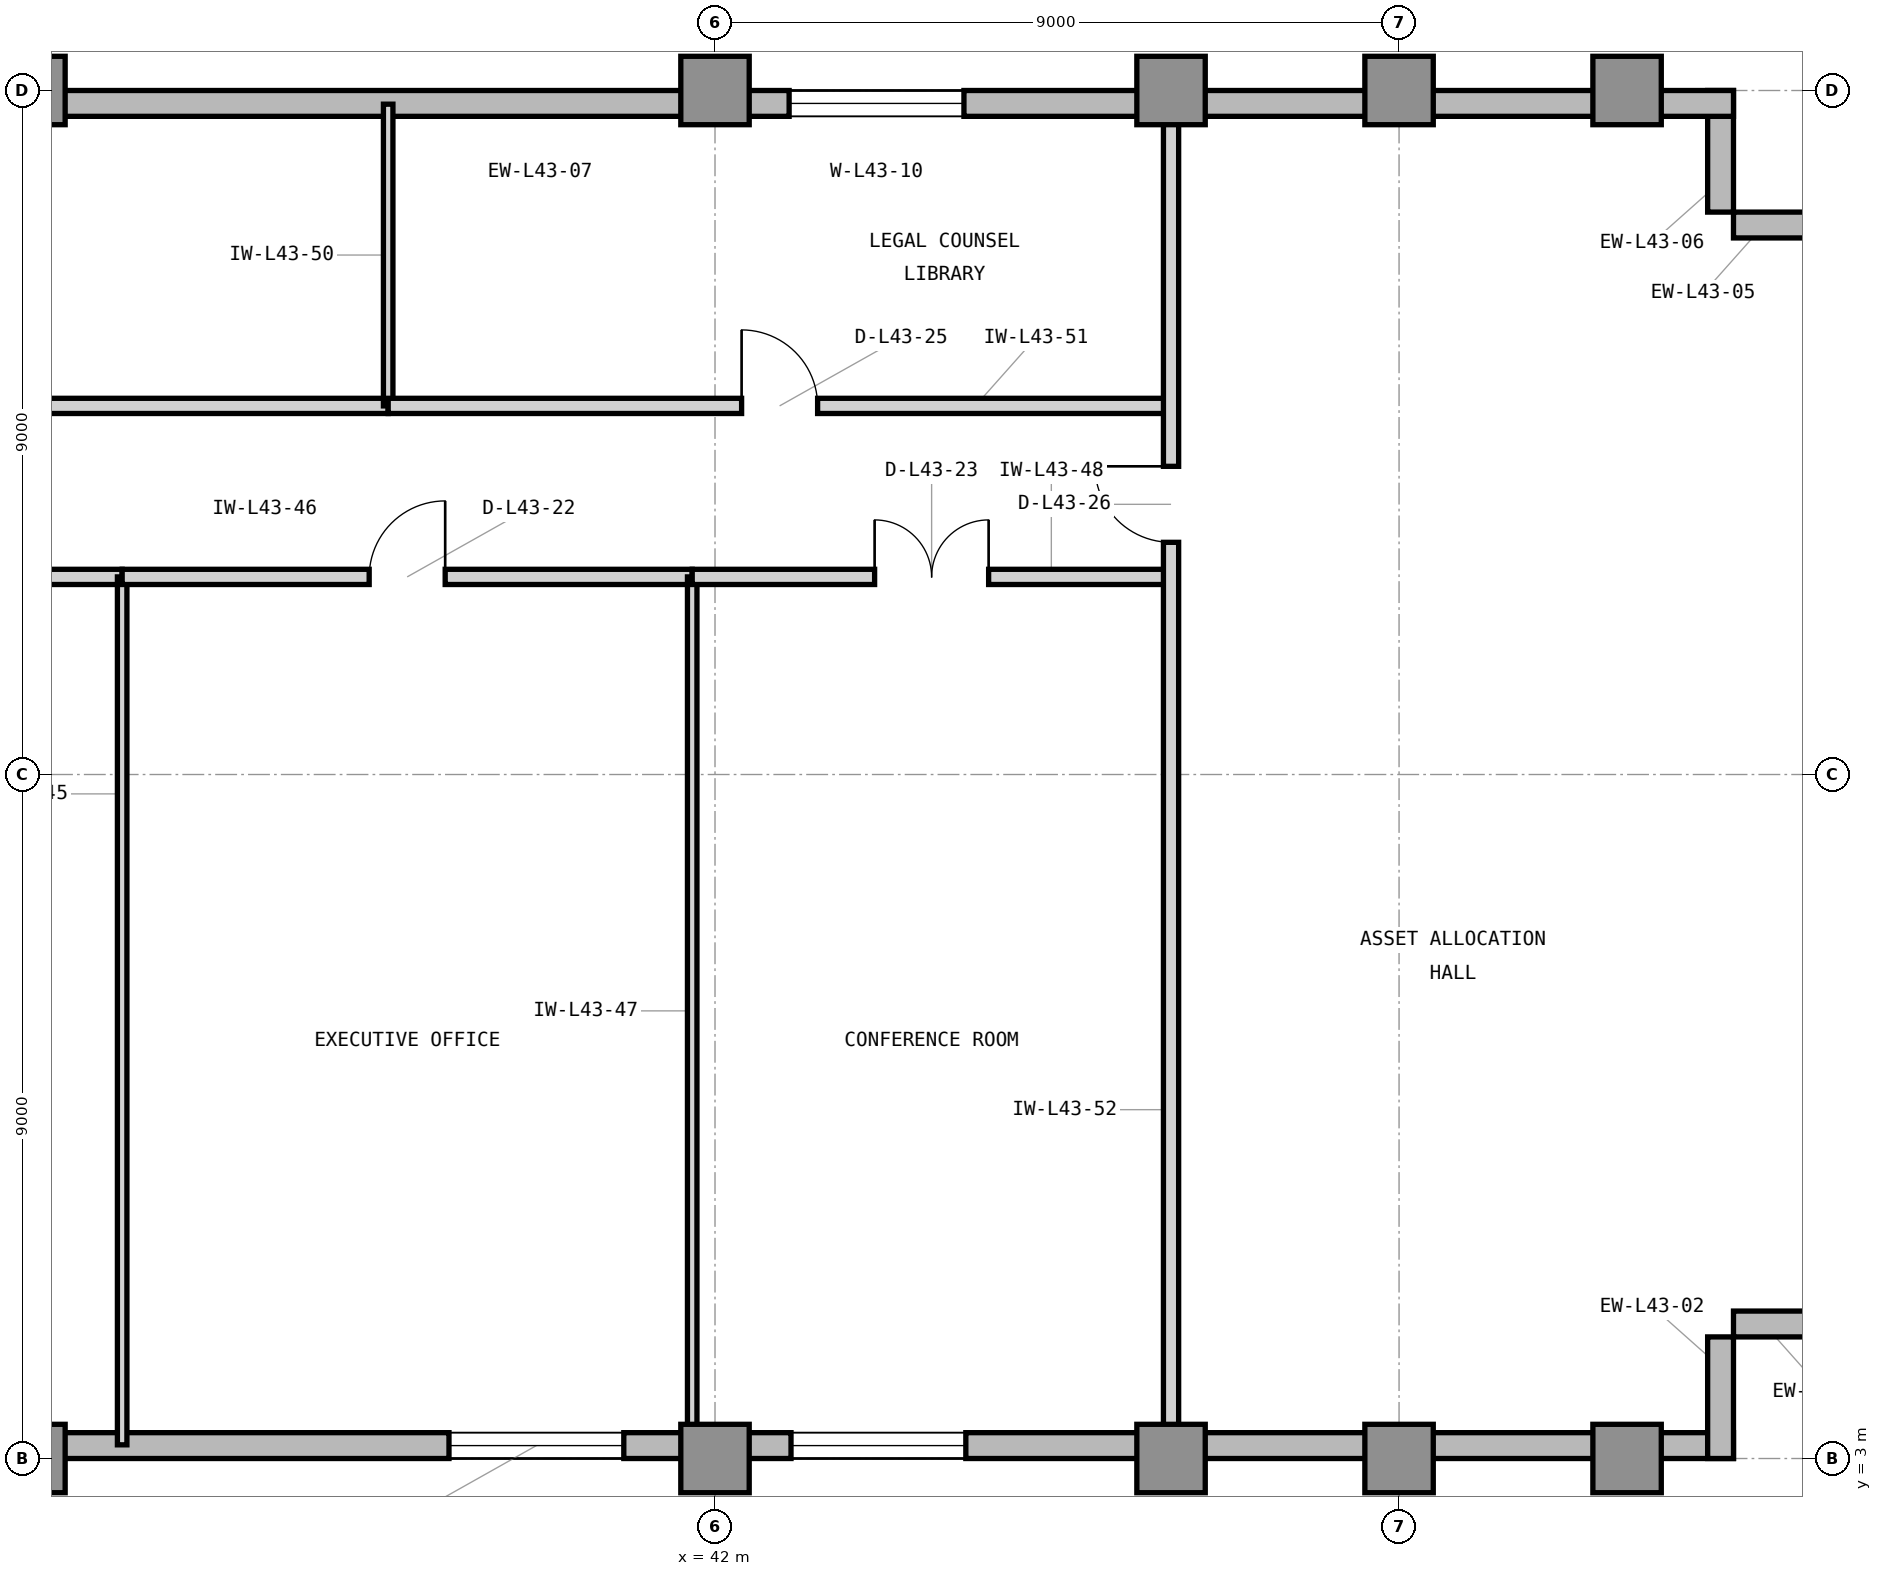
"""IFC4 building model, lengths in metres.
Left out: names, types, materials, properties, quantities, classifications, styles, units other than length and angle.
Written with IfcOpenShell. Run it as: python <this file> out.ifc"""

import sys

from ifc_helpers import new_model, si_unit, direction, frame, frame_2d, origin, origin_2d, place, context, subcontext, project, spatial, rectangle, extrude, element, fill, save


model = new_model("IFC4")
c1 = context("Model", 3, precision=1e-05, world=origin(), true_north=direction((0.0, 1.0)))
c2 = subcontext(c1, "Body", "Model", "MODEL_VIEW")
j1 = project(units=[si_unit("LENGTHUNIT", "METRE"), si_unit("PLANEANGLEUNIT", "RADIAN")], contexts=[c1])
p1 = place(None, origin())
s1 = spatial("IfcSite", under=j1, at=p1, CompositionType="ELEMENT")
p2 = place(p1, origin())
s2 = spatial("IfcBuilding", under=s1, at=p2, CompositionType="ELEMENT")
p3 = place(p2, frame((0.0, 0.0, 180.0)))
s3 = spatial("IfcBuildingStorey", under=s2, at=p3, CompositionType="ELEMENT", Elevation=180.0)
for number, where, z_axis, x_axis in (
    (1, (33.0, 3.0, 0.0), (0.0, 0.0, 1.0), (1.0, 0.0, 0.0)),
    (2, (33.0, 21.0, 0.0), (0.0, 0.0, 1.0), (1.0, 0.0, 0.0)),
    (3, (42.0, 3.0, 0.0), (0.0, 0.0, 1.0), (1.0, 0.0, 0.0)),
    (4, (42.0, 21.0, 0.0), (0.0, 0.0, 1.0), (1.0, 0.0, 0.0)),
    (5, (48.0, 3.0, 0.0), (0.0, 0.0, 1.0), (1.0, 0.0, 0.0)),
    (6, (48.0, 21.0, 0.0), (0.0, 0.0, 1.0), (1.0, 0.0, 0.0)),
    (7, (51.0, 3.0, 0.0), (0.0, 0.0, 1.0), (1.0, 0.0, 0.0)),
    (8, (51.0, 21.0, 0.0), (0.0, 0.0, 1.0), (1.0, 0.0, 0.0)),
    (9, (54.0, 3.0, 0.0), (0.0, 0.0, 1.0), (1.0, 0.0, 0.0)),
    (10, (54.0, 21.0, 0.0), (0.0, 0.0, 1.0), (1.0, 0.0, 0.0)),
):
    element("IfcColumn", number, at=place(p3, frame(where, z_axis=z_axis, x_axis=x_axis)), inside=s3, PredefinedType="COLUMN", context=c2, shape_type="SweptSolid", body=[
        extrude(rectangle(XDim=0.9, YDim=0.9, at=origin_2d()), origin(), (0.0, 0.0, 1.0), 3.9),
    ])
p4 = place(p3, frame((23.9, 3.17, 0.0), z_axis=(0.0, 0.0, 1.0), x_axis=(1.0, 0.0, 0.0)))
e11 = element("IfcWall", 11, at=p4, inside=s3, PredefinedType="STANDARD", context=c2, shape_type="SweptSolid", body=[
    extrude(rectangle(XDim=31.5, YDim=0.34, at=frame_2d((15.75, 0.0))), origin(), (0.0, 0.0, 1.0), 3.7),
])
p5 = place(p4, frame((5.6, 0.0, 0.9)))
e12 = element("IfcOpeningElement", 12, at=p5, cuts=e11, PredefinedType="OPENING", context=c2, shape_type="SweptSolid", body=[
    extrude(rectangle(XDim=2.3, YDim=2.2, at=frame_2d((1.15, 1.1))), frame((0.0, 0.18, 0.0), z_axis=(0.0, -1.0, 0.0), x_axis=(1.0, 0.0, 0.0)), (0.0, 0.0, 1.0), 0.36),
])
p6 = place(p4, frame((14.6, 0.0, 0.9)))
e13 = element("IfcOpeningElement", 13, at=p6, cuts=e11, PredefinedType="OPENING", context=c2, shape_type="SweptSolid", body=[
    extrude(rectangle(XDim=2.3, YDim=2.2, at=frame_2d((1.15, 1.1))), frame((0.0, 0.18, 0.0), z_axis=(0.0, -1.0, 0.0), x_axis=(1.0, 0.0, 0.0)), (0.0, 0.0, 1.0), 0.36),
])
p7 = place(p4, frame((19.1, 0.0, 0.9)))
e14 = element("IfcOpeningElement", 14, at=p7, cuts=e11, PredefinedType="OPENING", context=c2, shape_type="SweptSolid", body=[
    extrude(rectangle(XDim=2.3, YDim=2.2, at=frame_2d((1.15, 1.1))), frame((0.0, 0.18, 0.0), z_axis=(0.0, -1.0, 0.0), x_axis=(1.0, 0.0, 0.0)), (0.0, 0.0, 1.0), 0.36),
])
p8 = place(p4, frame((0.9, 0.0, 0.9)))
e15 = element("IfcOpeningElement", 15, at=p8, cuts=e11, PredefinedType="OPENING", context=c2, shape_type="SweptSolid", body=[
    extrude(rectangle(XDim=1.6, YDim=2.2, at=frame_2d((0.8, 1.1))), frame((0.0, 0.18, 0.0), z_axis=(0.0, -1.0, 0.0), x_axis=(1.0, 0.0, 0.0)), (0.0, 0.0, 1.0), 0.36),
])
for number, where, z_axis, x_axis in (
    (16, (55.23, 3.0, 0.0), (0.0, 0.0, 1.0), (0.0, 1.0, 0.0)),
    (17, (55.4, 4.77, 0.0), (0.0, 0.0, 1.0), (1.0, 0.0, 0.0)),
    (18, (57.0, 19.23, 0.0), (0.0, 0.0, 1.0), (-1.0, 0.0, 0.0)),
    (19, (55.23, 19.4, 0.0), (0.0, 0.0, 1.0), (0.0, 1.0, 0.0)),
):
    element("IfcWall", number, at=place(p3, frame(where, z_axis=z_axis, x_axis=x_axis)), inside=s3, PredefinedType="STANDARD", context=c2, shape_type="SweptSolid", body=[
        extrude(rectangle(XDim=1.6, YDim=0.34, at=frame_2d((0.8, 0.0))), origin(), (0.0, 0.0, 1.0), 3.7),
    ])
p9 = place(p3, frame((55.4, 20.83, 0.0), z_axis=(0.0, 0.0, 1.0), x_axis=(-1.0, 0.0, 0.0)))
e20 = element("IfcWall", 20, at=p9, inside=s3, PredefinedType="STANDARD", context=c2, shape_type="SweptSolid", body=[
    extrude(rectangle(XDim=31.4, YDim=0.34, at=frame_2d((15.7, 0.0))), origin(), (0.0, 0.0, 1.0), 3.7),
])
p10 = place(p9, frame((29.046, 0.0, 0.9)))
e21 = element("IfcOpeningElement", 21, at=p10, cuts=e20, PredefinedType="OPENING", context=c2, shape_type="SweptSolid", body=[
    extrude(rectangle(XDim=1.6, YDim=2.2, at=frame_2d((0.8, 1.1))), frame((0.0, 0.18, 0.0), z_axis=(0.0, -1.0, 0.0), x_axis=(1.0, 0.0, 0.0)), (0.0, 0.0, 1.0), 0.36),
])
p11 = place(p9, frame((10.125, 0.0, 0.9)))
e22 = element("IfcOpeningElement", 22, at=p11, cuts=e20, PredefinedType="OPENING", context=c2, shape_type="SweptSolid", body=[
    extrude(rectangle(XDim=2.3, YDim=2.2, at=frame_2d((1.15, 1.1))), frame((0.0, 0.18, 0.0), z_axis=(0.0, -1.0, 0.0), x_axis=(1.0, 0.0, 0.0)), (0.0, 0.0, 1.0), 0.36),
])
p12 = place(p3, frame((26.7, 14.6, 0.0), z_axis=(0.0, 0.0, 1.0), x_axis=(1.0, 0.0, 0.0)))
e23 = element("IfcWall", 23, at=p12, inside=s3, PredefinedType="PARTITIONING", context=c2, shape_type="SweptSolid", body=[
    extrude(rectangle(XDim=7.5, YDim=0.2, at=frame_2d((3.75, 0.0))), origin(), (0.0, 0.0, 1.0), 3.69),
])
p13 = place(p12, frame((2.75, 0.0, 0.0)))
e24 = element("IfcOpeningElement", 24, at=p13, cuts=e23, PredefinedType="OPENING", context=c2, shape_type="SweptSolid", body=[
    extrude(rectangle(XDim=2.0, YDim=2.5, at=frame_2d((1.0, 1.25))), frame((0.0, 0.11, 0.0), z_axis=(0.0, -1.0, 0.0), x_axis=(1.0, 0.0, 0.0)), (0.0, 0.0, 1.0), 0.22),
])
p14 = place(p3, frame((34.2, 3.18, 0.0), z_axis=(0.0, 0.0, 1.0), x_axis=(0.0, 1.0, 0.0)))
e25 = element("IfcWall", 25, at=p14, inside=s3, PredefinedType="PARTITIONING", context=c2, shape_type="SweptSolid", body=[
    extrude(rectangle(XDim=11.42, YDim=0.125, at=frame_2d((5.71, 0.0))), origin(), (0.0, 0.0, 1.0), 3.69),
])
p15 = place(p3, frame((34.2, 14.6, 0.0), z_axis=(0.0, 0.0, 1.0), x_axis=(1.0, 0.0, 0.0)))
e26 = element("IfcWall", 26, at=p15, inside=s3, PredefinedType="PARTITIONING", context=c2, shape_type="SweptSolid", body=[
    extrude(rectangle(XDim=7.5, YDim=0.2, at=frame_2d((3.75, 0.0))), origin(), (0.0, 0.0, 1.0), 3.69),
])
p16 = place(p15, frame((3.25, 0.0, 0.0)))
e27 = element("IfcOpeningElement", 27, at=p16, cuts=e26, PredefinedType="OPENING", context=c2, shape_type="SweptSolid", body=[
    extrude(rectangle(XDim=1.0, YDim=2.15, at=frame_2d((0.5, 1.075))), frame((0.0, 0.11, 0.0), z_axis=(0.0, -1.0, 0.0), x_axis=(1.0, 0.0, 0.0)), (0.0, 0.0, 1.0), 0.22),
])
p17 = place(p3, frame((41.7, 3.18, 0.0), z_axis=(0.0, 0.0, 1.0), x_axis=(0.0, 1.0, 0.0)))
e28 = element("IfcWall", 28, at=p17, inside=s3, PredefinedType="PARTITIONING", context=c2, shape_type="SweptSolid", body=[
    extrude(rectangle(XDim=11.42, YDim=0.125, at=frame_2d((5.71, 0.0))), origin(), (0.0, 0.0, 1.0), 3.69),
])
p18 = place(p3, frame((41.7, 14.6, 0.0), z_axis=(0.0, 0.0, 1.0), x_axis=(1.0, 0.0, 0.0)))
e29 = element("IfcWall", 29, at=p18, inside=s3, PredefinedType="PARTITIONING", context=c2, shape_type="SweptSolid", body=[
    extrude(rectangle(XDim=6.3, YDim=0.2, at=frame_2d((3.15, 0.0))), origin(), (0.0, 0.0, 1.0), 3.69),
])
p19 = place(p18, frame((2.4, 0.0, 0.0)))
e30 = element("IfcOpeningElement", 30, at=p19, cuts=e29, PredefinedType="OPENING", context=c2, shape_type="SweptSolid", body=[
    extrude(rectangle(XDim=1.5, YDim=2.3, at=frame_2d((0.75, 1.15))), frame((0.0, 0.11, 0.0), z_axis=(0.0, -1.0, 0.0), x_axis=(1.0, 0.0, 0.0)), (0.0, 0.0, 1.0), 0.22),
])
p20 = place(p3, frame((26.7, 16.85, 0.0), z_axis=(0.0, 0.0, 1.0), x_axis=(1.0, 0.0, 0.0)))
e31 = element("IfcWall", 31, at=p20, inside=s3, PredefinedType="PARTITIONING", context=c2, shape_type="SweptSolid", body=[
    extrude(rectangle(XDim=11.0, YDim=0.2, at=frame_2d((5.5, 0.0))), origin(), (0.0, 0.0, 1.0), 3.69),
])
p21 = place(p20, frame((4.75, 0.0, 0.0)))
e32 = element("IfcOpeningElement", 32, at=p21, cuts=e31, PredefinedType="OPENING", context=c2, shape_type="SweptSolid", body=[
    extrude(rectangle(XDim=1.5, YDim=2.3, at=frame_2d((0.75, 1.15))), frame((0.0, 0.11, 0.0), z_axis=(0.0, -1.0, 0.0), x_axis=(1.0, 0.0, 0.0)), (0.0, 0.0, 1.0), 0.22),
])
p22 = place(p3, frame((37.7, 16.85, 0.0), z_axis=(0.0, 0.0, 1.0), x_axis=(0.0, 1.0, 0.0)))
e33 = element("IfcWall", 33, at=p22, inside=s3, PredefinedType="PARTITIONING", context=c2, shape_type="SweptSolid", body=[
    extrude(rectangle(XDim=3.97, YDim=0.125, at=frame_2d((1.985, 0.0))), origin(), (0.0, 0.0, 1.0), 3.69),
])
p23 = place(p3, frame((37.7, 16.85, 0.0), z_axis=(0.0, 0.0, 1.0), x_axis=(1.0, 0.0, 0.0)))
e34 = element("IfcWall", 34, at=p23, inside=s3, PredefinedType="PARTITIONING", context=c2, shape_type="SweptSolid", body=[
    extrude(rectangle(XDim=10.3, YDim=0.2, at=frame_2d((5.15, 0.0))), origin(), (0.0, 0.0, 1.0), 3.69),
])
p24 = place(p23, frame((4.65, 0.0, 0.0)))
e35 = element("IfcOpeningElement", 35, at=p24, cuts=e34, PredefinedType="OPENING", context=c2, shape_type="SweptSolid", body=[
    extrude(rectangle(XDim=1.0, YDim=2.15, at=frame_2d((0.5, 1.075))), frame((0.0, 0.11, 0.0), z_axis=(0.0, -1.0, 0.0), x_axis=(1.0, 0.0, 0.0)), (0.0, 0.0, 1.0), 0.22),
])
p25 = place(p3, frame((48.0, 3.18, 0.0), z_axis=(0.0, 0.0, 1.0), x_axis=(0.0, 1.0, 0.0)))
e36 = element("IfcWall", 36, at=p25, inside=s3, PredefinedType="PARTITIONING", context=c2, shape_type="SweptSolid", body=[
    extrude(rectangle(XDim=17.64, YDim=0.2, at=frame_2d((8.82, 0.0))), origin(), (0.0, 0.0, 1.0), 3.073),
])
p26 = place(p25, frame((11.875, 0.0, 0.0)))
e37 = element("IfcOpeningElement", 37, at=p26, cuts=e36, PredefinedType="OPENING", context=c2, shape_type="SweptSolid", body=[
    extrude(rectangle(XDim=1.0, YDim=2.15, at=frame_2d((0.5, 1.075))), frame((0.0, 0.11, 0.0), z_axis=(0.0, -1.0, 0.0), x_axis=(1.0, 0.0, 0.0)), (0.0, 0.0, 1.0), 0.22),
])
p27 = place(p6, origin())
e38 = element("IfcWindow", 38, at=p27, inside=s3, PartitioningType="SINGLE_PANEL", PredefinedType="WINDOW", context=c2, shape_type="SweptSolid", body=[
    extrude(rectangle(XDim=2.3, YDim=2.2, at=frame_2d((1.15, 1.1))), frame((0.0, 0.11, 0.0), z_axis=(0.0, -1.0, 0.0), x_axis=(1.0, 0.0, 0.0)), (0.0, 0.0, 1.0), 0.06),
])
fill(e13, e38)
p28 = place(p7, origin())
e39 = element("IfcWindow", 39, at=p28, inside=s3, PartitioningType="SINGLE_PANEL", PredefinedType="WINDOW", context=c2, shape_type="SweptSolid", body=[
    extrude(rectangle(XDim=2.3, YDim=2.2, at=frame_2d((1.15, 1.1))), frame((0.0, 0.11, 0.0), z_axis=(0.0, -1.0, 0.0), x_axis=(1.0, 0.0, 0.0)), (0.0, 0.0, 1.0), 0.06),
])
fill(e14, e39)
p29 = place(p16, origin())
e40 = element("IfcDoor", 40, at=p29, inside=s3, OperationType="SINGLE_SWING_RIGHT", PredefinedType="DOOR", context=c2, shape_type="SweptSolid", body=[
    extrude(rectangle(XDim=1.0, YDim=2.15, at=frame_2d((0.5, 1.075))), frame((0.0, 0.025, 0.0), z_axis=(0.0, -1.0, 0.0), x_axis=(1.0, 0.0, 0.0)), (0.0, 0.0, 1.0), 0.05),
])
fill(e27, e40)
p30 = place(p19, origin())
e41 = element("IfcDoor", 41, at=p30, inside=s3, OperationType="DOUBLE_DOOR_SINGLE_SWING", PredefinedType="DOOR", context=c2, shape_type="SweptSolid", body=[
    extrude(rectangle(XDim=1.5, YDim=2.3, at=frame_2d((0.75, 1.15))), frame((0.0, 0.025, 0.0), z_axis=(0.0, -1.0, 0.0), x_axis=(1.0, 0.0, 0.0)), (0.0, 0.0, 1.0), 0.05),
])
fill(e30, e41)
p31 = place(p24, origin())
e42 = element("IfcDoor", 42, at=p31, inside=s3, OperationType="SINGLE_SWING_LEFT", PredefinedType="DOOR", context=c2, shape_type="SweptSolid", body=[
    extrude(rectangle(XDim=1.0, YDim=2.15, at=frame_2d((0.5, 1.075))), frame((0.0, 0.025, 0.0), z_axis=(0.0, -1.0, 0.0), x_axis=(1.0, 0.0, 0.0)), (0.0, 0.0, 1.0), 0.05),
])
fill(e35, e42)
p32 = place(p26, origin())
e43 = element("IfcDoor", 43, at=p32, inside=s3, OperationType="SINGLE_SWING_RIGHT", PredefinedType="DOOR", context=c2, shape_type="SweptSolid", body=[
    extrude(rectangle(XDim=1.0, YDim=2.15, at=frame_2d((0.5, 1.075))), frame((0.0, 0.025, 0.0), z_axis=(0.0, -1.0, 0.0), x_axis=(1.0, 0.0, 0.0)), (0.0, 0.0, 1.0), 0.05),
])
fill(e37, e43)
p33 = place(p11, origin())
e44 = element("IfcWindow", 44, at=p33, inside=s3, PartitioningType="SINGLE_PANEL", PredefinedType="WINDOW", context=c2, shape_type="SweptSolid", body=[
    extrude(rectangle(XDim=2.3, YDim=2.2, at=frame_2d((1.15, 1.1))), frame((0.0, 0.11, 0.0), z_axis=(0.0, -1.0, 0.0), x_axis=(1.0, 0.0, 0.0)), (0.0, 0.0, 1.0), 0.06),
])
fill(e22, e44)
save(model, sys.argv[1])
